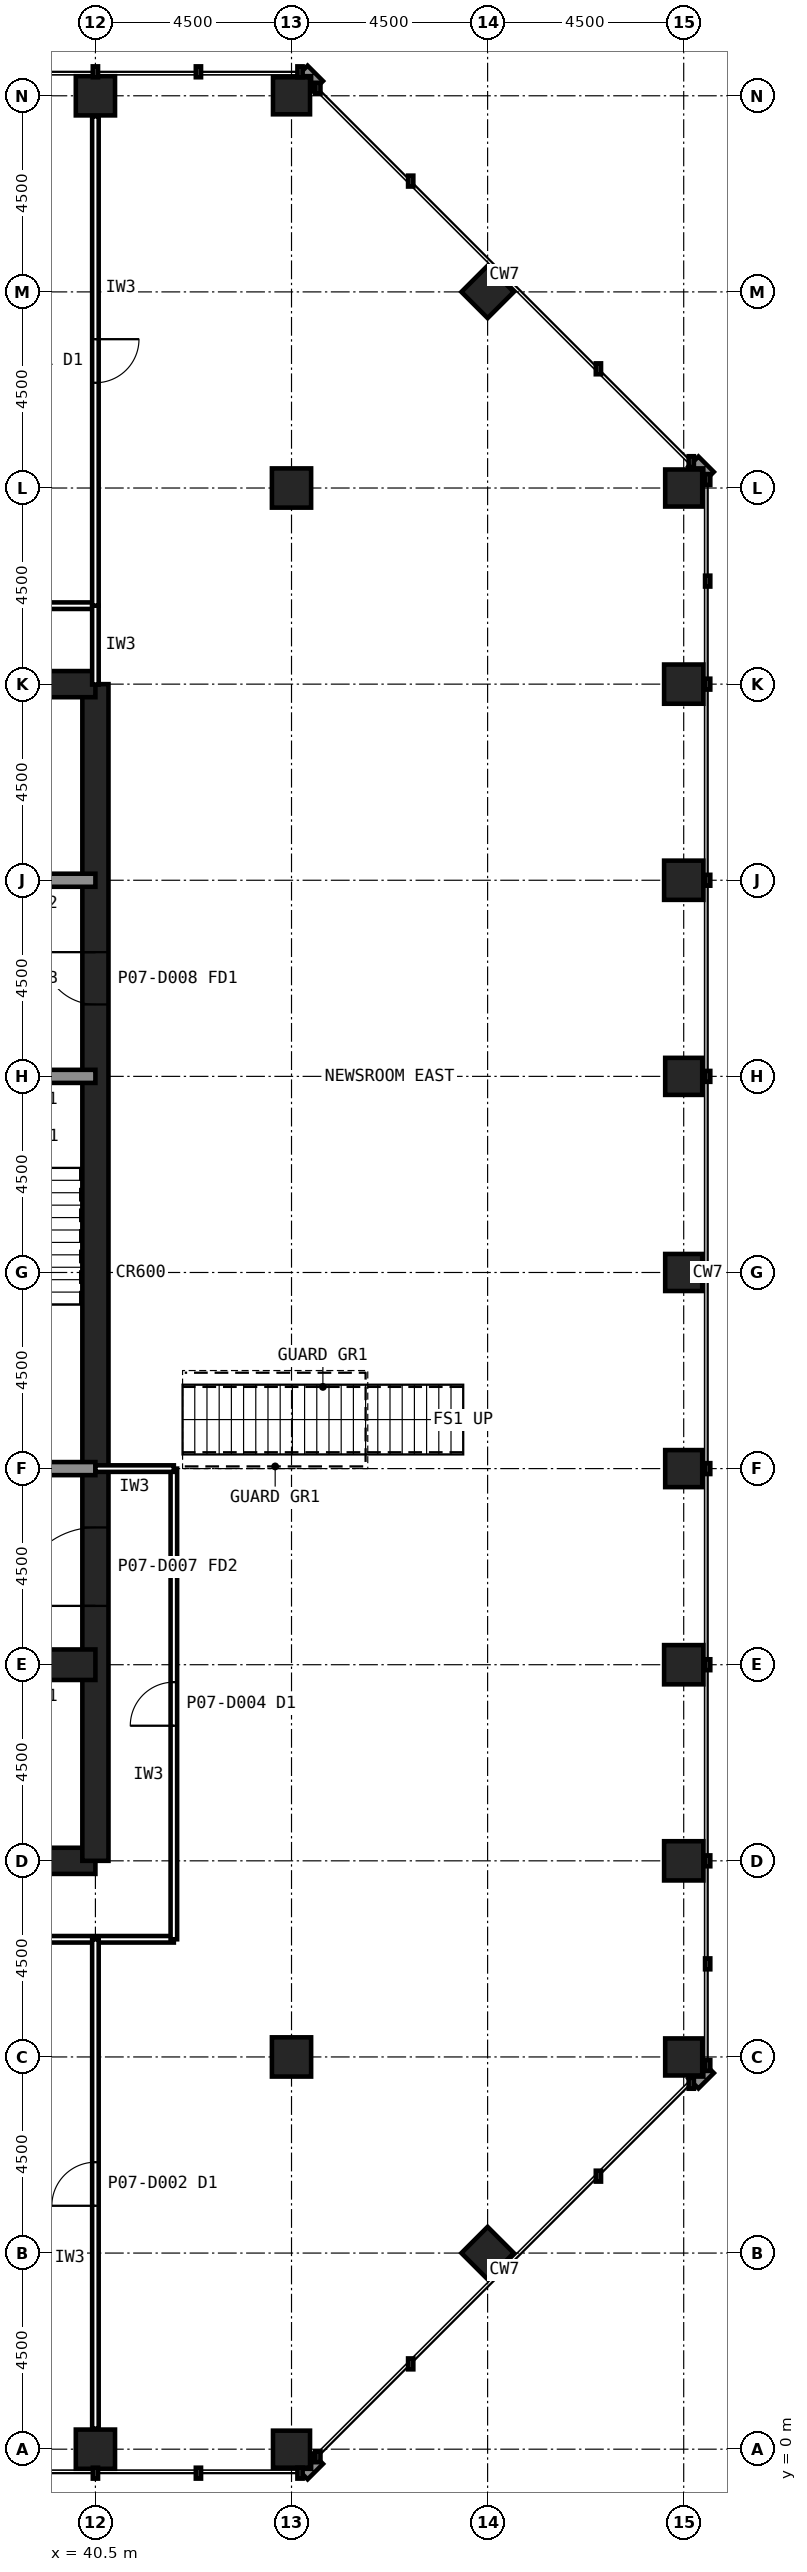
"""IFC4 building model, lengths in metres.
Left out: names, types, materials, properties, quantities, classifications, styles, units other than length and angle.
Written with IfcOpenShell. Run it as: python <this file> out.ifc"""

import sys

from ifc_helpers import new_model, si_unit, direction, frame, frame_2d, origin, origin_2d, place, context, subcontext, project, spatial, rectangle, hollow_rectangle, extrude, element, fill, save


model = new_model("IFC4")
c1 = context("Model", 3, precision=1e-05, world=origin(), true_north=direction((0.0, 1.0)))
c2 = subcontext(c1, "Body", "Model", "MODEL_VIEW")
j1 = project(units=[si_unit("LENGTHUNIT", "METRE"), si_unit("PLANEANGLEUNIT", "RADIAN")], contexts=[c1])
p1 = place(None, origin())
s1 = spatial("IfcSite", under=j1, at=p1, CompositionType="ELEMENT")
p2 = place(p1, origin())
s2 = spatial("IfcBuilding", under=s1, at=p2, CompositionType="ELEMENT")
p3 = place(p2, frame((0.0, 0.0, 33.2)))
s3 = spatial("IfcBuildingStorey", under=s2, at=p3, CompositionType="ELEMENT", Elevation=33.2)
p4 = place(p3, frame((40.5, 0.0, 0.0), z_axis=(0.0, 0.0, 1.0), x_axis=(1.0, 0.0, 0.0)))
e1 = element("IfcColumn", 1, at=p4, inside=s3, PredefinedType="COLUMN", context=c2, shape_type="SweptSolid", body=[
    extrude(hollow_rectangle(XDim=0.9, YDim=0.9, WallThickness=0.063, at=origin_2d()), origin(), (0.0, 0.0, 1.0), 4.2),
])
for number, where, z_axis, x_axis in (
    (2, (45.0, 0.0, 0.0), (0.0, 0.0, 1.0), (1.0, 0.0, 0.0)),
    (3, (54.0, 9.0, 0.0), (0.0, 0.0, 1.0), (1.0, 0.0, 0.0)),
):
    element("IfcColumn", number, at=place(p3, frame(where, z_axis=z_axis, x_axis=x_axis)), inside=s3, PredefinedType="COLUMN", context=c2, shape_type="SweptSolid", body=[
        extrude(hollow_rectangle(XDim=0.85, YDim=0.85, WallThickness=0.05, at=origin_2d()), origin(), (0.0, 0.0, 1.0), 4.2),
    ])
for number, where, z_axis, x_axis in (
    (4, (54.0, 13.5, 0.0), (0.0, 0.0, 1.0), (1.0, 0.0, 0.0)),
    (5, (54.0, 18.0, 0.0), (0.0, 0.0, 1.0), (1.0, 0.0, 0.0)),
):
    element("IfcColumn", number, at=place(p3, frame(where, z_axis=z_axis, x_axis=x_axis)), inside=s3, PredefinedType="COLUMN", context=c2, shape_type="SweptSolid", body=[
        extrude(hollow_rectangle(XDim=0.9, YDim=0.9, WallThickness=0.063, at=origin_2d()), origin(), (0.0, 0.0, 1.0), 4.2),
    ])
for number, where, z_axis, x_axis in (
    (6, (54.0, 22.5, 0.0), (0.0, 0.0, 1.0), (1.0, 0.0, 0.0)),
    (7, (54.0, 27.0, 0.0), (0.0, 0.0, 1.0), (1.0, 0.0, 0.0)),
    (8, (54.0, 31.5, 0.0), (0.0, 0.0, 1.0), (1.0, 0.0, 0.0)),
):
    element("IfcColumn", number, at=place(p3, frame(where, z_axis=z_axis, x_axis=x_axis)), inside=s3, PredefinedType="COLUMN", context=c2, shape_type="SweptSolid", body=[
        extrude(hollow_rectangle(XDim=0.85, YDim=0.85, WallThickness=0.05, at=origin_2d()), origin(), (0.0, 0.0, 1.0), 4.2),
    ])
for number, where, z_axis, x_axis in (
    (9, (54.0, 36.0, 0.0), (0.0, 0.0, 1.0), (1.0, 0.0, 0.0)),
    (10, (54.0, 40.5, 0.0), (0.0, 0.0, 1.0), (1.0, 0.0, 0.0)),
):
    element("IfcColumn", number, at=place(p3, frame(where, z_axis=z_axis, x_axis=x_axis)), inside=s3, PredefinedType="COLUMN", context=c2, shape_type="SweptSolid", body=[
        extrude(hollow_rectangle(XDim=0.9, YDim=0.9, WallThickness=0.063, at=origin_2d()), origin(), (0.0, 0.0, 1.0), 4.2),
    ])
for number, where, z_axis, x_axis in (
    (11, (54.0, 45.0, 0.0), (0.0, 0.0, 1.0), (1.0, 0.0, 0.0)),
    (12, (45.0, 54.0, 0.0), (0.0, 0.0, 1.0), (1.0, 0.0, 0.0)),
):
    element("IfcColumn", number, at=place(p3, frame(where, z_axis=z_axis, x_axis=x_axis)), inside=s3, PredefinedType="COLUMN", context=c2, shape_type="SweptSolid", body=[
        extrude(hollow_rectangle(XDim=0.85, YDim=0.85, WallThickness=0.05, at=origin_2d()), origin(), (0.0, 0.0, 1.0), 4.2),
    ])
p5 = place(p3, frame((40.5, 54.0, 0.0), z_axis=(0.0, 0.0, 1.0), x_axis=(1.0, 0.0, 0.0)))
e13 = element("IfcColumn", 13, at=p5, inside=s3, PredefinedType="COLUMN", context=c2, shape_type="SweptSolid", body=[
    extrude(hollow_rectangle(XDim=0.9, YDim=0.9, WallThickness=0.063, at=origin_2d()), origin(), (0.0, 0.0, 1.0), 4.2),
])
for number, where, z_axis, x_axis in (
    (14, (49.5, 4.5, 0.0), (0.0, 0.0, 1.0), (0.707, 0.707, 0.0)),
    (15, (49.5, 49.5, 0.0), (0.0, 0.0, 1.0), (0.707, 0.707, 0.0)),
):
    element("IfcColumn", number, at=place(p3, frame(where, z_axis=z_axis, x_axis=x_axis)), inside=s3, PredefinedType="COLUMN", context=c2, shape_type="SweptSolid", body=[
        extrude(hollow_rectangle(XDim=0.85, YDim=0.85, WallThickness=0.05, at=origin_2d()), origin(), (0.0, 0.0, 1.0), 4.2),
    ])
for number, where, z_axis, x_axis in (
    (16, (45.0, 9.0, 0.0), (0.0, 0.0, 1.0), (1.0, 0.0, 0.0)),
    (17, (45.0, 45.0, 0.0), (0.0, 0.0, 1.0), (1.0, 0.0, 0.0)),
):
    element("IfcColumn", number, at=place(p3, frame(where, z_axis=z_axis, x_axis=x_axis)), inside=s3, PredefinedType="COLUMN", context=c2, shape_type="SweptSolid", body=[
        extrude(hollow_rectangle(XDim=0.9, YDim=0.9, WallThickness=0.063, at=origin_2d()), origin(), (0.0, 0.0, 1.0), 4.2),
    ])
p6 = place(p3, frame((13.5, 13.5, 0.0), z_axis=(0.0, 0.0, 1.0), x_axis=(1.0, 0.0, 0.0)))
e18 = element("IfcWall", 18, at=p6, inside=s3, PredefinedType="SHEAR", context=c2, shape_type="SweptSolid", body=[
    extrude(rectangle(XDim=27.0, YDim=0.6, at=frame_2d((13.5, 0.0))), origin(), (0.0, 0.0, 1.0), 4.2),
])
p7 = place(p3, frame((40.5, 13.5, 0.0), z_axis=(0.0, 0.0, 1.0), x_axis=(0.0, 1.0, 0.0)))
e19 = element("IfcWall", 19, at=p7, inside=s3, PredefinedType="SHEAR", context=c2, shape_type="SweptSolid", body=[
    extrude(rectangle(XDim=27.0, YDim=0.6, at=frame_2d((13.5, 0.0))), origin(), (0.0, 0.0, 1.0), 4.2),
])
p8 = place(p7, frame((5.85, 0.0, 0.0)))
e20 = element("IfcOpeningElement", 20, at=p8, cuts=e19, PredefinedType="OPENING", context=c2, shape_type="SweptSolid", body=[
    extrude(rectangle(XDim=1.8, YDim=2.1, at=frame_2d((0.9, 1.05))), frame((0.0, 0.31, 0.0), z_axis=(0.0, -1.0, 0.0), x_axis=(1.0, 0.0, 0.0)), (0.0, 0.0, 1.0), 0.62),
])
p9 = place(p7, frame((19.65, 0.0, 0.0)))
e21 = element("IfcOpeningElement", 21, at=p9, cuts=e19, PredefinedType="OPENING", context=c2, shape_type="SweptSolid", body=[
    extrude(rectangle(XDim=1.2, YDim=2.1, at=frame_2d((0.6, 1.05))), frame((0.0, 0.31, 0.0), z_axis=(0.0, -1.0, 0.0), x_axis=(1.0, 0.0, 0.0)), (0.0, 0.0, 1.0), 0.62),
])
p10 = place(p3, frame((40.5, 40.5, 0.0), z_axis=(0.0, 0.0, 1.0), x_axis=(-1.0, 0.0, 0.0)))
e22 = element("IfcWall", 22, at=p10, inside=s3, PredefinedType="SHEAR", context=c2, shape_type="SweptSolid", body=[
    extrude(rectangle(XDim=27.0, YDim=0.6, at=frame_2d((13.5, 0.0))), origin(), (0.0, 0.0, 1.0), 4.2),
])
p11 = place(p3, frame((13.5, 18.0, 0.0), z_axis=(0.0, 0.0, 1.0), x_axis=(1.0, 0.0, 0.0)))
e23 = element("IfcWall", 23, at=p11, inside=s3, PredefinedType="SHEAR", context=c2, shape_type="SweptSolid", body=[
    extrude(rectangle(XDim=27.0, YDim=0.7, at=frame_2d((13.5, 0.0))), origin(), (0.0, 0.0, 1.0), 4.2),
])
p12 = place(p11, frame((24.3, 0.0, 0.0)))
e24 = element("IfcOpeningElement", 24, at=p12, cuts=e23, PredefinedType="OPENING", context=c2, shape_type="SweptSolid", body=[
    extrude(rectangle(XDim=0.9, YDim=2.1, at=frame_2d((0.45, 1.05))), frame((0.0, 0.36, 0.0), z_axis=(0.0, -1.0, 0.0), x_axis=(1.0, 0.0, 0.0)), (0.0, 0.0, 1.0), 0.72),
])
p13 = place(p11, frame((5.45, 0.0, 0.0)))
e25 = element("IfcOpeningElement", 25, at=p13, cuts=e23, PredefinedType="OPENING", context=c2, shape_type="SweptSolid", body=[
    extrude(rectangle(XDim=1.1, YDim=2.1, at=frame_2d((0.55, 1.05))), frame((0.0, 0.36, 0.0), z_axis=(0.0, -1.0, 0.0), x_axis=(1.0, 0.0, 0.0)), (0.0, 0.0, 1.0), 0.72),
])
p14 = place(p11, frame((8.45, 0.0, 0.0)))
e26 = element("IfcOpeningElement", 26, at=p14, cuts=e23, PredefinedType="OPENING", context=c2, shape_type="SweptSolid", body=[
    extrude(rectangle(XDim=1.1, YDim=2.1, at=frame_2d((0.55, 1.05))), frame((0.0, 0.36, 0.0), z_axis=(0.0, -1.0, 0.0), x_axis=(1.0, 0.0, 0.0)), (0.0, 0.0, 1.0), 0.72),
])
p15 = place(p11, frame((11.45, 0.0, 0.0)))
e27 = element("IfcOpeningElement", 27, at=p15, cuts=e23, PredefinedType="OPENING", context=c2, shape_type="SweptSolid", body=[
    extrude(rectangle(XDim=1.1, YDim=2.1, at=frame_2d((0.55, 1.05))), frame((0.0, 0.36, 0.0), z_axis=(0.0, -1.0, 0.0), x_axis=(1.0, 0.0, 0.0)), (0.0, 0.0, 1.0), 0.72),
])
p16 = place(p11, frame((14.45, 0.0, 0.0)))
e28 = element("IfcOpeningElement", 28, at=p16, cuts=e23, PredefinedType="OPENING", context=c2, shape_type="SweptSolid", body=[
    extrude(rectangle(XDim=1.1, YDim=2.1, at=frame_2d((0.55, 1.05))), frame((0.0, 0.36, 0.0), z_axis=(0.0, -1.0, 0.0), x_axis=(1.0, 0.0, 0.0)), (0.0, 0.0, 1.0), 0.72),
])
p17 = place(p11, frame((17.45, 0.0, 0.0)))
e29 = element("IfcOpeningElement", 29, at=p17, cuts=e23, PredefinedType="OPENING", context=c2, shape_type="SweptSolid", body=[
    extrude(rectangle(XDim=1.1, YDim=2.1, at=frame_2d((0.55, 1.05))), frame((0.0, 0.36, 0.0), z_axis=(0.0, -1.0, 0.0), x_axis=(1.0, 0.0, 0.0)), (0.0, 0.0, 1.0), 0.72),
])
p18 = place(p11, frame((20.45, 0.0, 0.0)))
e30 = element("IfcOpeningElement", 30, at=p18, cuts=e23, PredefinedType="OPENING", context=c2, shape_type="SweptSolid", body=[
    extrude(rectangle(XDim=1.1, YDim=2.1, at=frame_2d((0.55, 1.05))), frame((0.0, 0.36, 0.0), z_axis=(0.0, -1.0, 0.0), x_axis=(1.0, 0.0, 0.0)), (0.0, 0.0, 1.0), 0.72),
])
p19 = place(p11, frame((1.6, 0.0, 0.0)))
e31 = element("IfcOpeningElement", 31, at=p19, cuts=e23, PredefinedType="OPENING", context=c2, shape_type="SweptSolid", body=[
    extrude(rectangle(XDim=1.3, YDim=2.2, at=frame_2d((0.65, 1.1))), frame((0.0, 0.36, 0.0), z_axis=(0.0, -1.0, 0.0), x_axis=(1.0, 0.0, 0.0)), (0.0, 0.0, 1.0), 0.72),
])
p20 = place(p3, frame((13.5, 36.0, 0.0), z_axis=(0.0, 0.0, 1.0), x_axis=(1.0, 0.0, 0.0)))
e32 = element("IfcWall", 32, at=p20, inside=s3, PredefinedType="SOLIDWALL", context=c2, shape_type="SweptSolid", body=[
    extrude(rectangle(XDim=27.0, YDim=0.3, at=frame_2d((13.5, 0.0))), origin(), (0.0, 0.0, 1.0), 4.04),
])
p21 = place(p20, frame((1.8, 0.0, 0.0)))
e33 = element("IfcOpeningElement", 33, at=p21, cuts=e32, PredefinedType="OPENING", context=c2, shape_type="SweptSolid", body=[
    extrude(rectangle(XDim=0.9, YDim=2.1, at=frame_2d((0.45, 1.05))), frame((0.0, 0.16, 0.0), z_axis=(0.0, -1.0, 0.0), x_axis=(1.0, 0.0, 0.0)), (0.0, 0.0, 1.0), 0.32),
])
p22 = place(p20, frame((24.1, 0.0, 0.0)))
e34 = element("IfcOpeningElement", 34, at=p22, cuts=e32, PredefinedType="OPENING", context=c2, shape_type="SweptSolid", body=[
    extrude(rectangle(XDim=1.3, YDim=2.2, at=frame_2d((0.65, 1.1))), frame((0.0, 0.16, 0.0), z_axis=(0.0, -1.0, 0.0), x_axis=(1.0, 0.0, 0.0)), (0.0, 0.0, 1.0), 0.32),
])
p23 = place(p3, frame((13.5, 22.5, 0.0), z_axis=(0.0, 0.0, 1.0), x_axis=(1.0, 0.0, 0.0)))
e35 = element("IfcWall", 35, at=p23, inside=s3, PredefinedType="SOLIDWALL", context=c2, shape_type="SweptSolid", body=[
    extrude(rectangle(XDim=27.0, YDim=0.3, at=frame_2d((13.5, 0.0))), origin(), (0.0, 0.0, 1.0), 4.04),
])
p24 = place(p23, frame((1.65, 0.0, 0.0)))
e36 = element("IfcOpeningElement", 36, at=p24, cuts=e35, PredefinedType="OPENING", context=c2, shape_type="SweptSolid", body=[
    extrude(rectangle(XDim=1.2, YDim=2.1, at=frame_2d((0.6, 1.05))), frame((0.0, 0.16, 0.0), z_axis=(0.0, -1.0, 0.0), x_axis=(1.0, 0.0, 0.0)), (0.0, 0.0, 1.0), 0.32),
])
p25 = place(p23, frame((6.025, 0.0, 0.0)))
e37 = element("IfcOpeningElement", 37, at=p25, cuts=e35, PredefinedType="OPENING", context=c2, shape_type="SweptSolid", body=[
    extrude(rectangle(XDim=1.0, YDim=2.1, at=frame_2d((0.5, 1.05))), frame((0.0, 0.16, 0.0), z_axis=(0.0, -1.0, 0.0), x_axis=(1.0, 0.0, 0.0)), (0.0, 0.0, 1.0), 0.32),
])
p26 = place(p23, frame((10.525, 0.0, 0.0)))
e38 = element("IfcOpeningElement", 38, at=p26, cuts=e35, PredefinedType="OPENING", context=c2, shape_type="SweptSolid", body=[
    extrude(rectangle(XDim=1.0, YDim=2.1, at=frame_2d((0.5, 1.05))), frame((0.0, 0.16, 0.0), z_axis=(0.0, -1.0, 0.0), x_axis=(1.0, 0.0, 0.0)), (0.0, 0.0, 1.0), 0.32),
])
p27 = place(p23, frame((19.75, 0.0, 0.0)))
e39 = element("IfcOpeningElement", 39, at=p27, cuts=e35, PredefinedType="OPENING", context=c2, shape_type="SweptSolid", body=[
    extrude(rectangle(XDim=1.0, YDim=2.1, at=frame_2d((0.5, 1.05))), frame((0.0, 0.16, 0.0), z_axis=(0.0, -1.0, 0.0), x_axis=(1.0, 0.0, 0.0)), (0.0, 0.0, 1.0), 0.32),
])
p28 = place(p23, frame((15.05, 0.0, 0.0)))
e40 = element("IfcOpeningElement", 40, at=p28, cuts=e35, PredefinedType="OPENING", context=c2, shape_type="SweptSolid", body=[
    extrude(rectangle(XDim=1.4, YDim=2.4, at=frame_2d((0.7, 1.2))), frame((0.0, 0.16, 0.0), z_axis=(0.0, -1.0, 0.0), x_axis=(1.0, 0.0, 0.0)), (0.0, 0.0, 1.0), 0.32),
])
p29 = place(p3, frame((13.5, 31.5, 0.0), z_axis=(0.0, 0.0, 1.0), x_axis=(1.0, 0.0, 0.0)))
e41 = element("IfcWall", 41, at=p29, inside=s3, PredefinedType="SOLIDWALL", context=c2, shape_type="SweptSolid", body=[
    extrude(rectangle(XDim=27.0, YDim=0.3, at=frame_2d((13.5, 0.0))), origin(), (0.0, 0.0, 1.0), 4.04),
])
p30 = place(p29, frame((24.15, 0.0, 0.0)))
e42 = element("IfcOpeningElement", 42, at=p30, cuts=e41, PredefinedType="OPENING", context=c2, shape_type="SweptSolid", body=[
    extrude(rectangle(XDim=1.2, YDim=2.1, at=frame_2d((0.6, 1.05))), frame((0.0, 0.16, 0.0), z_axis=(0.0, -1.0, 0.0), x_axis=(1.0, 0.0, 0.0)), (0.0, 0.0, 1.0), 0.32),
])
p31 = place(p29, frame((15.3, 0.0, 0.0)))
e43 = element("IfcOpeningElement", 43, at=p31, cuts=e41, PredefinedType="OPENING", context=c2, shape_type="SweptSolid", body=[
    extrude(rectangle(XDim=0.9, YDim=2.1, at=frame_2d((0.45, 1.05))), frame((0.0, 0.16, 0.0), z_axis=(0.0, -1.0, 0.0), x_axis=(1.0, 0.0, 0.0)), (0.0, 0.0, 1.0), 0.32),
])
p32 = place(p29, frame((19.8, 0.0, 0.0)))
e44 = element("IfcOpeningElement", 44, at=p32, cuts=e41, PredefinedType="OPENING", context=c2, shape_type="SweptSolid", body=[
    extrude(rectangle(XDim=0.9, YDim=2.1, at=frame_2d((0.45, 1.05))), frame((0.0, 0.16, 0.0), z_axis=(0.0, -1.0, 0.0), x_axis=(1.0, 0.0, 0.0)), (0.0, 0.0, 1.0), 0.32),
])
p33 = place(p3, frame((11.7, 11.7, 0.0), z_axis=(0.0, 0.0, 1.0), x_axis=(1.0, 0.0, 0.0)))
e45 = element("IfcWall", 45, at=p33, inside=s3, PredefinedType="PARTITIONING", context=c2, shape_type="SweptSolid", body=[
    extrude(rectangle(XDim=30.6, YDim=0.15, at=frame_2d((15.3, 0.0))), origin(), (0.0, 0.0, 1.0), 4.04),
])
p34 = place(p33, frame((14.8, 0.0, 0.0)))
e46 = element("IfcOpeningElement", 46, at=p34, cuts=e45, PredefinedType="OPENING", context=c2, shape_type="SweptSolid", body=[
    extrude(rectangle(XDim=1.0, YDim=2.1, at=frame_2d((0.5, 1.05))), frame((0.0, 0.085, 0.0), z_axis=(0.0, -1.0, 0.0), x_axis=(1.0, 0.0, 0.0)), (0.0, 0.0, 1.0), 0.17),
])
p35 = place(p3, frame((42.3, 11.7, 0.0), z_axis=(0.0, 0.0, 1.0), x_axis=(0.0, 1.0, 0.0)))
e47 = element("IfcWall", 47, at=p35, inside=s3, PredefinedType="PARTITIONING", context=c2, shape_type="SweptSolid", body=[
    extrude(rectangle(XDim=10.8, YDim=0.15, at=frame_2d((5.4, 0.0))), origin(), (0.0, 0.0, 1.0), 4.04),
])
p36 = place(p35, frame((4.9, 0.0, 0.0)))
e48 = element("IfcOpeningElement", 48, at=p36, cuts=e47, PredefinedType="OPENING", context=c2, shape_type="SweptSolid", body=[
    extrude(rectangle(XDim=1.0, YDim=2.1, at=frame_2d((0.5, 1.05))), frame((0.0, 0.085, 0.0), z_axis=(0.0, -1.0, 0.0), x_axis=(1.0, 0.0, 0.0)), (0.0, 0.0, 1.0), 0.17),
])
p37 = place(p3, frame((40.5, 42.3, 0.0), z_axis=(0.0, 0.0, 1.0), x_axis=(-1.0, 0.0, 0.0)))
e49 = element("IfcWall", 49, at=p37, inside=s3, PredefinedType="PARTITIONING", context=c2, shape_type="SweptSolid", body=[
    extrude(rectangle(XDim=2.7, YDim=0.15, at=frame_2d((1.35, 0.0))), origin(), (0.0, 0.0, 1.0), 4.04),
])
p38 = place(p3, frame((40.5, 40.49, 0.0), z_axis=(0.0, 0.0, 1.0), x_axis=(0.0, 1.0, 0.0)))
e50 = element("IfcWall", 50, at=p38, inside=s3, PredefinedType="PARTITIONING", context=c2, shape_type="SweptSolid", body=[
    extrude(rectangle(XDim=1.81, YDim=0.15, at=frame_2d((0.905, 0.0))), origin(), (0.0, 0.0, 1.0), 3.189),
])
p39 = place(p3, frame((42.3, 22.5, 0.0), z_axis=(0.0, 0.0, 1.0), x_axis=(-1.0, 0.0, 0.0)))
e51 = element("IfcWall", 51, at=p39, inside=s3, PredefinedType="PARTITIONING", context=c2, shape_type="SweptSolid", body=[
    extrude(rectangle(XDim=1.8, YDim=0.15, at=frame_2d((0.9, 0.0))), origin(), (0.0, 0.0, 1.0), 3.189),
])
p40 = place(p3, frame((40.5, 53.53, 0.0), z_axis=(0.0, 0.0, 1.0), x_axis=(0.0, -1.0, 0.0)))
e52 = element("IfcWall", 52, at=p40, inside=s3, PredefinedType="PARTITIONING", context=c2, shape_type="SweptSolid", body=[
    extrude(rectangle(XDim=11.23, YDim=0.15, at=frame_2d((5.615, 0.0))), origin(), (0.0, 0.0, 1.0), 3.189),
])
p41 = place(p40, frame((5.115, 0.0, 0.0)))
e53 = element("IfcOpeningElement", 53, at=p41, cuts=e52, PredefinedType="OPENING", context=c2, shape_type="SweptSolid", body=[
    extrude(rectangle(XDim=1.0, YDim=2.1, at=frame_2d((0.5, 1.05))), frame((0.0, 0.085, 0.0), z_axis=(0.0, -1.0, 0.0), x_axis=(1.0, 0.0, 0.0)), (0.0, 0.0, 1.0), 0.17),
])
p42 = place(p3, frame((40.5, 0.47, 0.0), z_axis=(0.0, 0.0, 1.0), x_axis=(0.0, 1.0, 0.0)))
e54 = element("IfcWall", 54, at=p42, inside=s3, PredefinedType="PARTITIONING", context=c2, shape_type="SweptSolid", body=[
    extrude(rectangle(XDim=11.23, YDim=0.15, at=frame_2d((5.615, 0.0))), origin(), (0.0, 0.0, 1.0), 3.189),
])
p43 = place(p42, frame((5.115, 0.0, 0.0)))
e55 = element("IfcOpeningElement", 55, at=p43, cuts=e54, PredefinedType="OPENING", context=c2, shape_type="SweptSolid", body=[
    extrude(rectangle(XDim=1.0, YDim=2.1, at=frame_2d((0.5, 1.05))), frame((0.0, 0.085, 0.0), z_axis=(0.0, -1.0, 0.0), x_axis=(1.0, 0.0, 0.0)), (0.0, 0.0, 1.0), 0.17),
])
p44 = place(p8, origin())
e56 = element("IfcDoor", 56, at=p44, inside=s3, OperationType="SINGLE_SWING_LEFT", PredefinedType="DOOR", context=c2, shape_type="SweptSolid", body=[
    extrude(rectangle(XDim=1.8, YDim=2.1, at=frame_2d((0.9, 1.05))), frame((0.0, 0.025, 0.0), z_axis=(0.0, -1.0, 0.0), x_axis=(1.0, 0.0, 0.0)), (0.0, 0.0, 1.0), 0.05),
])
fill(e20, e56)
p45 = place(p9, origin())
e57 = element("IfcDoor", 57, at=p45, inside=s3, OperationType="SINGLE_SWING_RIGHT", PredefinedType="DOOR", context=c2, shape_type="SweptSolid", body=[
    extrude(rectangle(XDim=1.2, YDim=2.1, at=frame_2d((0.6, 1.05))), frame((0.0, 0.025, 0.0), z_axis=(0.0, -1.0, 0.0), x_axis=(1.0, 0.0, 0.0)), (0.0, 0.0, 1.0), 0.05),
])
fill(e21, e57)
p46 = place(p36, origin())
e58 = element("IfcDoor", 58, at=p46, inside=s3, OperationType="SINGLE_SWING_LEFT", PredefinedType="DOOR", context=c2, shape_type="SweptSolid", body=[
    extrude(rectangle(XDim=1.0, YDim=2.1, at=frame_2d((0.5, 1.05))), frame((0.0, 0.025, 0.0), z_axis=(0.0, -1.0, 0.0), x_axis=(1.0, 0.0, 0.0)), (0.0, 0.0, 1.0), 0.05),
])
fill(e48, e58)
p47 = place(p41, origin())
e59 = element("IfcDoor", 59, at=p47, inside=s3, OperationType="SINGLE_SWING_LEFT", PredefinedType="DOOR", context=c2, shape_type="SweptSolid", body=[
    extrude(rectangle(XDim=1.0, YDim=2.1, at=frame_2d((0.5, 1.05))), frame((0.0, 0.025, 0.0), z_axis=(0.0, -1.0, 0.0), x_axis=(1.0, 0.0, 0.0)), (0.0, 0.0, 1.0), 0.05),
])
fill(e53, e59)
p48 = place(p43, origin())
e60 = element("IfcDoor", 60, at=p48, inside=s3, OperationType="SINGLE_SWING_LEFT", PredefinedType="DOOR", context=c2, shape_type="SweptSolid", body=[
    extrude(rectangle(XDim=1.0, YDim=2.1, at=frame_2d((0.5, 1.05))), frame((0.0, 0.025, 0.0), z_axis=(0.0, -1.0, 0.0), x_axis=(1.0, 0.0, 0.0)), (0.0, 0.0, 1.0), 0.05),
])
fill(e55, e60)
save(model, sys.argv[1])
